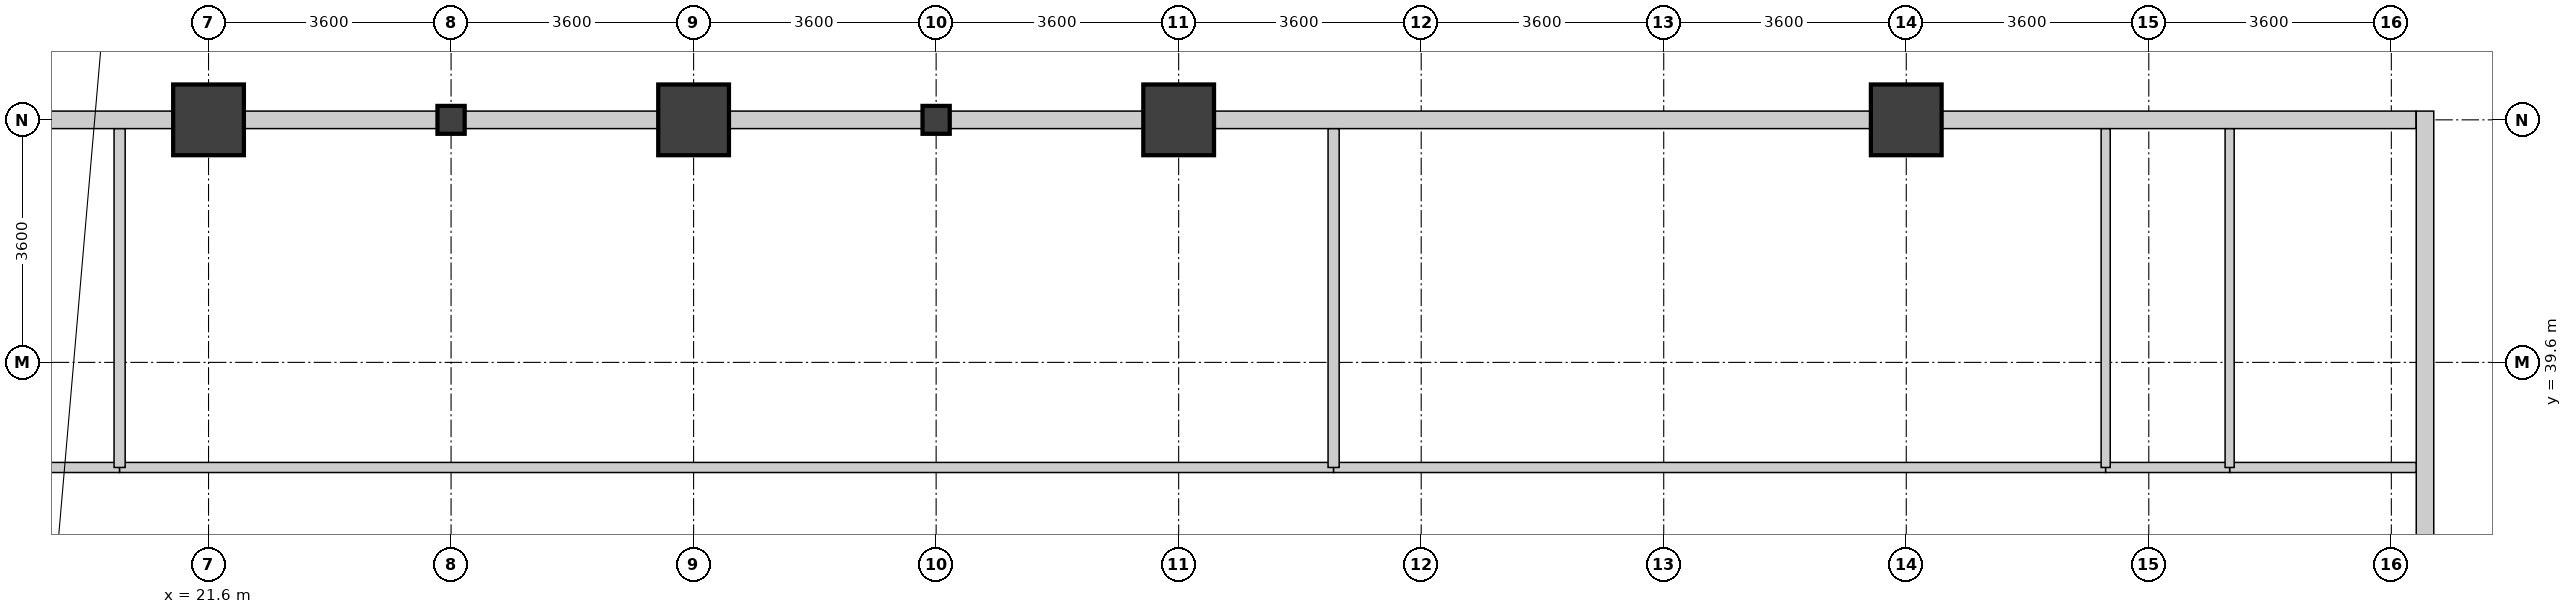
"""IFC4 building model, lengths in metres.
Left out: names, types, materials, properties, quantities, classifications, styles, units other than length and angle.
Written with IfcOpenShell. Run it as: python <this file> out.ifc"""

import sys

from ifc_helpers import new_model, si_unit, direction, frame, frame_2d, origin, origin_2d, place, context, subcontext, project, spatial, rectangle, i_section, extrude, source, transform, mapped, element, fill, save


model = new_model("IFC4")
c1 = context("Model", 3, precision=1e-05, world=origin(), true_north=direction((0.0, 1.0)))
c2 = subcontext(c1, "Body", "Model", "MODEL_VIEW")
j1 = project(units=[si_unit("LENGTHUNIT", "METRE"), si_unit("PLANEANGLEUNIT", "RADIAN")], contexts=[c1])
p1 = place(None, origin())
s1 = spatial("IfcSite", under=j1, at=p1, CompositionType="ELEMENT")
p2 = place(p1, origin())
s2 = spatial("IfcBuilding", under=s1, at=p2, CompositionType="ELEMENT")
p3 = place(p2, frame((0.0, 0.0, 135.6)))
s3 = spatial("IfcBuildingStorey", under=s2, at=p3, CompositionType="ELEMENT", Elevation=135.6)
m1 = source(origin(), c2, "Body", "SweptSolid", [
    extrude(rectangle(XDim=1.05, YDim=1.05, at=origin_2d()), origin(), (0.0, 0.0, 1.0), 4.6),
])
for number, where, z_axis, x_axis in (
    (1, (21.6, 43.2, 0.0), (0.0, 0.0, 1.0), (1.0, 0.0, 0.0)),
    (2, (28.8, 43.2, 0.0), (0.0, 0.0, 1.0), (1.0, 0.0, 0.0)),
    (3, (36.0, 43.2, 0.0), (0.0, 0.0, 1.0), (1.0, 0.0, 0.0)),
    (4, (46.8, 43.2, 0.0), (0.0, 0.0, 1.0), (1.0, 0.0, 0.0)),
):
    element("IfcColumn", number, at=place(p3, frame(where, z_axis=z_axis, x_axis=x_axis)), inside=s3, PredefinedType="COLUMN", context=c2, shape_type="MappedRepresentation", body=[
        mapped(m1, transform((0.0, 0.0, 0.0), x_axis=(1.0, 0.0, 0.0), y_axis=(0.0, 1.0, 0.0), z_axis=(0.0, 0.0, 1.0), scale=1.0)),
    ])
m2 = source(origin(), c2, "Body", "SweptSolid", [
    extrude(i_section(OverallWidth=0.404, OverallDepth=0.414, WebThickness=0.021, FlangeThickness=0.028, FilletRadius=0.015, at=origin_2d()), origin(), (0.0, 0.0, 1.0), 4.6),
])
for number, where, z_axis, x_axis in (
    (5, (25.2, 43.2, 0.0), (0.0, 0.0, 1.0), (1.0, 0.0, 0.0)),
    (6, (32.4, 43.2, 0.0), (0.0, 0.0, 1.0), (1.0, 0.0, 0.0)),
):
    element("IfcColumn", number, at=place(p3, frame(where, z_axis=z_axis, x_axis=x_axis)), inside=s3, PredefinedType="COLUMN", context=c2, shape_type="MappedRepresentation", body=[
        mapped(m2, transform((0.0, 0.0, 0.0), x_axis=(1.0, 0.0, 0.0), y_axis=(0.0, 1.0, 0.0), z_axis=(0.0, 0.0, 1.0), scale=1.0)),
    ])
p4 = place(p3, frame((54.5, 43.33, 0.0), z_axis=(0.0, 0.0, 1.0), x_axis=(0.0, -1.0, 0.0)))
e7 = element("IfcWall", 7, at=p4, inside=s3, PredefinedType="STANDARD", context=c2, shape_type="SweptSolid", body=[
    extrude(rectangle(XDim=6.654, YDim=0.26, at=frame_2d((3.327, 0.0))), origin(), (0.0, 0.0, 1.0), 4.34),
])
p5 = place(p4, frame((2.852, 0.0, 0.85)))
e8 = element("IfcOpeningElement", 8, at=p5, cuts=e7, PredefinedType="OPENING", context=c2, shape_type="SweptSolid", body=[
    extrude(rectangle(XDim=0.95, YDim=1.75, at=frame_2d((0.475, 0.875))), frame((0.0, 0.14, 0.0), z_axis=(0.0, -1.0, 0.0), x_axis=(1.0, 0.0, 0.0)), (0.0, 0.0, 1.0), 0.28),
])
p6 = place(p4, frame((1.202, 0.0, 0.85)))
e9 = element("IfcOpeningElement", 9, at=p6, cuts=e7, PredefinedType="OPENING", context=c2, shape_type="SweptSolid", body=[
    extrude(rectangle(XDim=0.95, YDim=1.75, at=frame_2d((0.475, 0.875))), frame((0.0, 0.14, 0.0), z_axis=(0.0, -1.0, 0.0), x_axis=(1.0, 0.0, 0.0)), (0.0, 0.0, 1.0), 0.28),
])
p7 = place(p3, frame((47.326, 43.2, 0.0), z_axis=(0.0, 0.0, 1.0), x_axis=(1.0, 0.0, 0.0)))
e10 = element("IfcWall", 10, at=p7, inside=s3, PredefinedType="STANDARD", context=c2, shape_type="SweptSolid", body=[
    extrude(rectangle(XDim=7.039, YDim=0.26, at=frame_2d((3.52, 0.0))), origin(), (0.0, 0.0, 1.0), 4.34),
])
p8 = place(p7, frame((4.74, 0.0, 0.0)))
e11 = element("IfcOpeningElement", 11, at=p8, cuts=e10, PredefinedType="OPENING", context=c2, shape_type="SweptSolid", body=[
    extrude(rectangle(XDim=1.5, YDim=2.15, at=frame_2d((0.75, 1.075))), frame((0.0, 0.14, 0.0), z_axis=(0.0, -1.0, 0.0), x_axis=(1.0, 0.0, 0.0)), (0.0, 0.0, 1.0), 0.28),
])
p9 = place(p3, frame((36.526, 43.2, 0.0), z_axis=(0.0, 0.0, 1.0), x_axis=(1.0, 0.0, 0.0)))
e12 = element("IfcWall", 12, at=p9, inside=s3, PredefinedType="STANDARD", context=c2, shape_type="SweptSolid", body=[
    extrude(rectangle(XDim=9.748, YDim=0.26, at=frame_2d((4.874, 0.0))), origin(), (0.0, 0.0, 1.0), 3.89),
])
p10 = place(p9, frame((3.524, 0.0, 0.85)))
e13 = element("IfcOpeningElement", 13, at=p10, cuts=e12, PredefinedType="OPENING", context=c2, shape_type="SweptSolid", body=[
    extrude(rectangle(XDim=2.7, YDim=2.05, at=frame_2d((1.35, 1.025))), frame((0.0, 0.14, 0.0), z_axis=(0.0, -1.0, 0.0), x_axis=(1.0, 0.0, 0.0)), (0.0, 0.0, 1.0), 0.28),
])
p11 = place(p9, frame((6.816, 0.0, 0.85)))
e14 = element("IfcOpeningElement", 14, at=p11, cuts=e12, PredefinedType="OPENING", context=c2, shape_type="SweptSolid", body=[
    extrude(rectangle(XDim=0.95, YDim=1.75, at=frame_2d((0.475, 0.875))), frame((0.0, 0.14, 0.0), z_axis=(0.0, -1.0, 0.0), x_axis=(1.0, 0.0, 0.0)), (0.0, 0.0, 1.0), 0.28),
])
p12 = place(p3, frame((32.603, 43.2, 0.0), z_axis=(0.0, 0.0, 1.0), x_axis=(1.0, 0.0, 0.0)))
e15 = element("IfcWall", 15, at=p12, inside=s3, PredefinedType="STANDARD", context=c2, shape_type="SweptSolid", body=[
    extrude(rectangle(XDim=2.871, YDim=0.26, at=frame_2d((1.436, 0.0))), origin(), (0.0, 0.0, 1.0), 3.89),
])
p13 = place(p12, frame((0.96, 0.0, 0.85)))
e16 = element("IfcOpeningElement", 16, at=p13, cuts=e15, PredefinedType="OPENING", context=c2, shape_type="SweptSolid", body=[
    extrude(rectangle(XDim=0.95, YDim=1.75, at=frame_2d((0.475, 0.875))), frame((0.0, 0.14, 0.0), z_axis=(0.0, -1.0, 0.0), x_axis=(1.0, 0.0, 0.0)), (0.0, 0.0, 1.0), 0.28),
])
p14 = place(p3, frame((29.326, 43.2, 0.0), z_axis=(0.0, 0.0, 1.0), x_axis=(1.0, 0.0, 0.0)))
e17 = element("IfcWall", 17, at=p14, inside=s3, PredefinedType="STANDARD", context=c2, shape_type="SweptSolid", body=[
    extrude(rectangle(XDim=2.871, YDim=0.26, at=frame_2d((1.436, 0.0))), origin(), (0.0, 0.0, 1.0), 3.89),
])
p15 = place(p14, frame((0.96, 0.0, 0.85)))
e18 = element("IfcOpeningElement", 18, at=p15, cuts=e17, PredefinedType="OPENING", context=c2, shape_type="SweptSolid", body=[
    extrude(rectangle(XDim=0.95, YDim=1.75, at=frame_2d((0.475, 0.875))), frame((0.0, 0.14, 0.0), z_axis=(0.0, -1.0, 0.0), x_axis=(1.0, 0.0, 0.0)), (0.0, 0.0, 1.0), 0.28),
])
p16 = place(p3, frame((25.403, 43.2, 0.0), z_axis=(0.0, 0.0, 1.0), x_axis=(1.0, 0.0, 0.0)))
e19 = element("IfcWall", 19, at=p16, inside=s3, PredefinedType="STANDARD", context=c2, shape_type="SweptSolid", body=[
    extrude(rectangle(XDim=2.871, YDim=0.26, at=frame_2d((1.436, 0.0))), origin(), (0.0, 0.0, 1.0), 3.89),
])
p17 = place(p16, frame((0.96, 0.0, 0.85)))
e20 = element("IfcOpeningElement", 20, at=p17, cuts=e19, PredefinedType="OPENING", context=c2, shape_type="SweptSolid", body=[
    extrude(rectangle(XDim=0.95, YDim=1.75, at=frame_2d((0.475, 0.875))), frame((0.0, 0.14, 0.0), z_axis=(0.0, -1.0, 0.0), x_axis=(1.0, 0.0, 0.0)), (0.0, 0.0, 1.0), 0.28),
])
p18 = place(p3, frame((22.126, 43.2, 0.0), z_axis=(0.0, 0.0, 1.0), x_axis=(1.0, 0.0, 0.0)))
e21 = element("IfcWall", 21, at=p18, inside=s3, PredefinedType="STANDARD", context=c2, shape_type="SweptSolid", body=[
    extrude(rectangle(XDim=2.871, YDim=0.26, at=frame_2d((1.436, 0.0))), origin(), (0.0, 0.0, 1.0), 3.89),
])
p19 = place(p18, frame((0.96, 0.0, 0.85)))
e22 = element("IfcOpeningElement", 22, at=p19, cuts=e21, PredefinedType="OPENING", context=c2, shape_type="SweptSolid", body=[
    extrude(rectangle(XDim=0.95, YDim=1.75, at=frame_2d((0.475, 0.875))), frame((0.0, 0.14, 0.0), z_axis=(0.0, -1.0, 0.0), x_axis=(1.0, 0.0, 0.0)), (0.0, 0.0, 1.0), 0.28),
])
p20 = place(p3, frame((18.203, 43.2, 0.0), z_axis=(0.0, 0.0, 1.0), x_axis=(1.0, 0.0, 0.0)))
e23 = element("IfcWall", 23, at=p20, inside=s3, PredefinedType="STANDARD", context=c2, shape_type="SweptSolid", body=[
    extrude(rectangle(XDim=2.871, YDim=0.26, at=frame_2d((1.436, 0.0))), origin(), (0.0, 0.0, 1.0), 3.89),
])
p21 = place(p20, frame((0.249, 0.0, 0.85)))
e24 = element("IfcOpeningElement", 24, at=p21, cuts=e23, PredefinedType="OPENING", context=c2, shape_type="SweptSolid", body=[
    extrude(rectangle(XDim=0.95, YDim=1.75, at=frame_2d((0.475, 0.875))), frame((0.0, 0.14, 0.0), z_axis=(0.0, -1.0, 0.0), x_axis=(1.0, 0.0, 0.0)), (0.0, 0.0, 1.0), 0.28),
])
p22 = place(p3, frame((0.632, 38.04, 0.0), z_axis=(0.0, 0.0, 1.0), x_axis=(1.0, 0.0, 0.0)))
e25 = element("IfcWall", 25, at=p22, inside=s3, PredefinedType="PARTITIONING", context=c2, shape_type="SweptSolid", body=[
    extrude(rectangle(XDim=19.648, YDim=0.15, at=frame_2d((9.824, 0.0))), origin(), (0.0, 0.0, 1.0), 4.34),
])
p23 = place(p22, frame((9.174, 0.0, 0.0)))
e26 = element("IfcOpeningElement", 26, at=p23, cuts=e25, PredefinedType="OPENING", context=c2, shape_type="SweptSolid", body=[
    extrude(rectangle(XDim=1.3, YDim=2.12, at=frame_2d((0.65, 1.06))), frame((0.0, 0.085, 0.0), z_axis=(0.0, -1.0, 0.0), x_axis=(1.0, 0.0, 0.0)), (0.0, 0.0, 1.0), 0.17),
])
p24 = place(p3, frame((20.28, 38.04, 0.0), z_axis=(0.0, 0.0, 1.0), x_axis=(1.0, 0.0, 0.0)))
e27 = element("IfcWall", 27, at=p24, inside=s3, PredefinedType="PARTITIONING", context=c2, shape_type="SweptSolid", body=[
    extrude(rectangle(XDim=18.02, YDim=0.15, at=frame_2d((9.01, 0.0))), origin(), (0.0, 0.0, 1.0), 4.34),
])
p25 = place(p24, frame((8.56, 0.0, 0.0)))
e28 = element("IfcOpeningElement", 28, at=p25, cuts=e27, PredefinedType="OPENING", context=c2, shape_type="SweptSolid", body=[
    extrude(rectangle(XDim=0.9, YDim=2.08, at=frame_2d((0.45, 1.04))), frame((0.0, 0.085, 0.0), z_axis=(0.0, -1.0, 0.0), x_axis=(1.0, 0.0, 0.0)), (0.0, 0.0, 1.0), 0.17),
])
p26 = place(p3, frame((38.3, 38.04, 0.0), z_axis=(0.0, 0.0, 1.0), x_axis=(1.0, 0.0, 0.0)))
e29 = element("IfcWall", 29, at=p26, inside=s3, PredefinedType="PARTITIONING", context=c2, shape_type="SweptSolid", body=[
    extrude(rectangle(XDim=11.46, YDim=0.15, at=frame_2d((5.73, 0.0))), origin(), (0.0, 0.0, 1.0), 4.34),
])
p27 = place(p26, frame((5.08, 0.0, 0.0)))
e30 = element("IfcOpeningElement", 30, at=p27, cuts=e29, PredefinedType="OPENING", context=c2, shape_type="SweptSolid", body=[
    extrude(rectangle(XDim=1.3, YDim=2.12, at=frame_2d((0.65, 1.06))), frame((0.0, 0.085, 0.0), z_axis=(0.0, -1.0, 0.0), x_axis=(1.0, 0.0, 0.0)), (0.0, 0.0, 1.0), 0.17),
])
p28 = place(p3, frame((51.6, 38.04, 0.0), z_axis=(0.0, 0.0, 1.0), x_axis=(1.0, 0.0, 0.0)))
e31 = element("IfcWall", 31, at=p28, inside=s3, PredefinedType="PARTITIONING", context=c2, shape_type="SweptSolid", body=[
    extrude(rectangle(XDim=2.768, YDim=0.15, at=frame_2d((1.384, 0.0))), origin(), (0.0, 0.0, 1.0), 4.34),
])
p29 = place(p28, frame((0.954, 0.0, 0.0)))
e32 = element("IfcOpeningElement", 32, at=p29, cuts=e31, PredefinedType="OPENING", context=c2, shape_type="SweptSolid", body=[
    extrude(rectangle(XDim=0.86, YDim=2.02, at=frame_2d((0.43, 1.01))), frame((0.0, 0.085, 0.0), z_axis=(0.0, -1.0, 0.0), x_axis=(1.0, 0.0, 0.0)), (0.0, 0.0, 1.0), 0.17),
])
p30 = place(p3, frame((49.76, 38.04, 0.0), z_axis=(0.0, 0.0, 1.0), x_axis=(1.0, 0.0, 0.0)))
e33 = element("IfcWall", 33, at=p30, inside=s3, PredefinedType="PARTITIONING", context=c2, shape_type="SweptSolid", body=[
    extrude(rectangle(XDim=1.84, YDim=0.15, at=frame_2d((0.92, 0.0))), origin(), (0.0, 0.0, 1.0), 4.34),
])
p31 = place(p30, frame((0.395, 0.0, 0.0)))
e34 = element("IfcOpeningElement", 34, at=p31, cuts=e33, PredefinedType="OPENING", context=c2, shape_type="SweptSolid", body=[
    extrude(rectangle(XDim=1.05, YDim=2.12, at=frame_2d((0.525, 1.06))), frame((0.0, 0.085, 0.0), z_axis=(0.0, -1.0, 0.0), x_axis=(1.0, 0.0, 0.0)), (0.0, 0.0, 1.0), 0.17),
])
for number, where, z_axis, x_axis in (
    (35, (20.28, 38.04, 0.0), (0.0, 0.0, 1.0), (0.0, 1.0, 0.0)),
    (36, (38.3, 38.04, 0.0), (0.0, 0.0, 1.0), (0.0, 1.0, 0.0)),
):
    element("IfcWall", number, at=place(p3, frame(where, z_axis=z_axis, x_axis=x_axis)), inside=s3, PredefinedType="PARTITIONING", context=c2, shape_type="SweptSolid", body=[
        extrude(rectangle(XDim=5.028, YDim=0.165, at=frame_2d((2.514, 0.0))), origin(), (0.0, 0.0, 1.0), 4.34),
    ])
for number, where, z_axis, x_axis in (
    (37, (49.76, 38.04, 0.0), (0.0, 0.0, 1.0), (0.0, 1.0, 0.0)),
    (38, (51.6, 38.04, 0.0), (0.0, 0.0, 1.0), (0.0, 1.0, 0.0)),
):
    element("IfcWall", number, at=place(p3, frame(where, z_axis=z_axis, x_axis=x_axis)), inside=s3, PredefinedType="PARTITIONING", context=c2, shape_type="SweptSolid", body=[
        extrude(rectangle(XDim=5.028, YDim=0.135, at=frame_2d((2.514, 0.0))), origin(), (0.0, 0.0, 1.0), 4.34),
    ])
p32 = place(p5, origin())
e39 = element("IfcWindow", 39, at=p32, inside=s3, PartitioningType="SINGLE_PANEL", PredefinedType="WINDOW", context=c2, shape_type="SweptSolid", body=[
    extrude(rectangle(XDim=0.95, YDim=1.75, at=frame_2d((0.475, 0.875))), frame((0.0, 0.03, 0.0), z_axis=(0.0, -1.0, 0.0), x_axis=(1.0, 0.0, 0.0)), (0.0, 0.0, 1.0), 0.06),
])
fill(e8, e39)
p33 = place(p6, origin())
e40 = element("IfcWindow", 40, at=p33, inside=s3, PartitioningType="SINGLE_PANEL", PredefinedType="WINDOW", context=c2, shape_type="SweptSolid", body=[
    extrude(rectangle(XDim=0.95, YDim=1.75, at=frame_2d((0.475, 0.875))), frame((0.0, 0.03, 0.0), z_axis=(0.0, -1.0, 0.0), x_axis=(1.0, 0.0, 0.0)), (0.0, 0.0, 1.0), 0.06),
])
fill(e9, e40)
p34 = place(p8, origin())
e41 = element("IfcDoor", 41, at=p34, inside=s3, OperationType="SLIDING_TO_LEFT", PredefinedType="DOOR", context=c2, shape_type="SweptSolid", body=[
    extrude(rectangle(XDim=1.5, YDim=2.15, at=frame_2d((0.75, 1.075))), frame((0.0, 0.025, 0.0), z_axis=(0.0, -1.0, 0.0), x_axis=(1.0, 0.0, 0.0)), (0.0, 0.0, 1.0), 0.05),
])
fill(e11, e41)
p35 = place(p10, origin())
e42 = element("IfcWindow", 42, at=p35, inside=s3, PartitioningType="SINGLE_PANEL", PredefinedType="WINDOW", context=c2, shape_type="SweptSolid", body=[
    extrude(rectangle(XDim=2.7, YDim=2.05, at=frame_2d((1.35, 1.025))), frame((0.0, 0.03, 0.0), z_axis=(0.0, -1.0, 0.0), x_axis=(1.0, 0.0, 0.0)), (0.0, 0.0, 1.0), 0.06),
])
fill(e13, e42)
p36 = place(p11, origin())
e43 = element("IfcWindow", 43, at=p36, inside=s3, PartitioningType="SINGLE_PANEL", PredefinedType="WINDOW", context=c2, shape_type="SweptSolid", body=[
    extrude(rectangle(XDim=0.95, YDim=1.75, at=frame_2d((0.475, 0.875))), frame((0.0, 0.03, 0.0), z_axis=(0.0, -1.0, 0.0), x_axis=(1.0, 0.0, 0.0)), (0.0, 0.0, 1.0), 0.06),
])
fill(e14, e43)
p37 = place(p13, origin())
e44 = element("IfcWindow", 44, at=p37, inside=s3, PartitioningType="SINGLE_PANEL", PredefinedType="WINDOW", context=c2, shape_type="SweptSolid", body=[
    extrude(rectangle(XDim=0.95, YDim=1.75, at=frame_2d((0.475, 0.875))), frame((0.0, 0.03, 0.0), z_axis=(0.0, -1.0, 0.0), x_axis=(1.0, 0.0, 0.0)), (0.0, 0.0, 1.0), 0.06),
])
fill(e16, e44)
p38 = place(p15, origin())
e45 = element("IfcWindow", 45, at=p38, inside=s3, PartitioningType="SINGLE_PANEL", PredefinedType="WINDOW", context=c2, shape_type="SweptSolid", body=[
    extrude(rectangle(XDim=0.95, YDim=1.75, at=frame_2d((0.475, 0.875))), frame((0.0, 0.03, 0.0), z_axis=(0.0, -1.0, 0.0), x_axis=(1.0, 0.0, 0.0)), (0.0, 0.0, 1.0), 0.06),
])
fill(e18, e45)
p39 = place(p17, origin())
e46 = element("IfcWindow", 46, at=p39, inside=s3, PartitioningType="SINGLE_PANEL", PredefinedType="WINDOW", context=c2, shape_type="SweptSolid", body=[
    extrude(rectangle(XDim=0.95, YDim=1.75, at=frame_2d((0.475, 0.875))), frame((0.0, 0.03, 0.0), z_axis=(0.0, -1.0, 0.0), x_axis=(1.0, 0.0, 0.0)), (0.0, 0.0, 1.0), 0.06),
])
fill(e20, e46)
p40 = place(p19, origin())
e47 = element("IfcWindow", 47, at=p40, inside=s3, PartitioningType="SINGLE_PANEL", PredefinedType="WINDOW", context=c2, shape_type="SweptSolid", body=[
    extrude(rectangle(XDim=0.95, YDim=1.75, at=frame_2d((0.475, 0.875))), frame((0.0, 0.03, 0.0), z_axis=(0.0, -1.0, 0.0), x_axis=(1.0, 0.0, 0.0)), (0.0, 0.0, 1.0), 0.06),
])
fill(e22, e47)
p41 = place(p21, origin())
e48 = element("IfcWindow", 48, at=p41, inside=s3, PartitioningType="SINGLE_PANEL", PredefinedType="WINDOW", context=c2, shape_type="SweptSolid", body=[
    extrude(rectangle(XDim=0.95, YDim=1.75, at=frame_2d((0.475, 0.875))), frame((0.0, 0.03, 0.0), z_axis=(0.0, -1.0, 0.0), x_axis=(1.0, 0.0, 0.0)), (0.0, 0.0, 1.0), 0.06),
])
fill(e24, e48)
p42 = place(p25, origin())
e49 = element("IfcDoor", 49, at=p42, inside=s3, OperationType="SINGLE_SWING_LEFT", PredefinedType="DOOR", context=c2, shape_type="SweptSolid", body=[
    extrude(rectangle(XDim=0.9, YDim=2.08, at=frame_2d((0.45, 1.04))), frame((0.0, 0.025, 0.0), z_axis=(0.0, -1.0, 0.0), x_axis=(1.0, 0.0, 0.0)), (0.0, 0.0, 1.0), 0.05),
])
fill(e28, e49)
p43 = place(p27, origin())
e50 = element("IfcDoor", 50, at=p43, inside=s3, OperationType="DOUBLE_DOOR_SINGLE_SWING", PredefinedType="DOOR", context=c2, shape_type="SweptSolid", body=[
    extrude(rectangle(XDim=1.3, YDim=2.12, at=frame_2d((0.65, 1.06))), frame((0.0, 0.025, 0.0), z_axis=(0.0, -1.0, 0.0), x_axis=(1.0, 0.0, 0.0)), (0.0, 0.0, 1.0), 0.05),
])
fill(e30, e50)
p44 = place(p29, origin())
e51 = element("IfcDoor", 51, at=p44, inside=s3, OperationType="SINGLE_SWING_RIGHT", PredefinedType="DOOR", context=c2, shape_type="SweptSolid", body=[
    extrude(rectangle(XDim=0.86, YDim=2.02, at=frame_2d((0.43, 1.01))), frame((0.0, 0.025, 0.0), z_axis=(0.0, -1.0, 0.0), x_axis=(1.0, 0.0, 0.0)), (0.0, 0.0, 1.0), 0.05),
])
fill(e32, e51)
p45 = place(p31, origin())
e52 = element("IfcDoor", 52, at=p45, inside=s3, OperationType="SINGLE_SWING_RIGHT", PredefinedType="DOOR", context=c2, shape_type="SweptSolid", body=[
    extrude(rectangle(XDim=1.05, YDim=2.12, at=frame_2d((0.525, 1.06))), frame((0.0, 0.025, 0.0), z_axis=(0.0, -1.0, 0.0), x_axis=(1.0, 0.0, 0.0)), (0.0, 0.0, 1.0), 0.05),
])
fill(e34, e52)
save(model, sys.argv[1])
